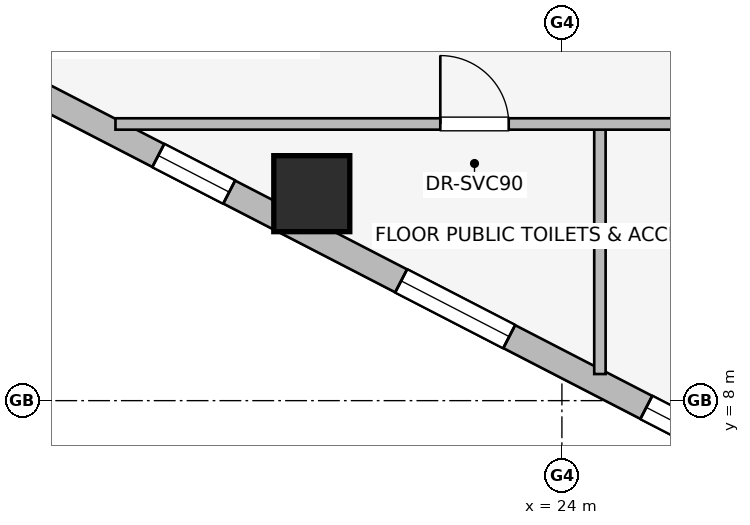
"""IFC4 building model, lengths in metres.
Left out: names, types, materials, properties, quantities, classifications, styles, units other than length and angle.
Written with IfcOpenShell. Run it as: python <this file> out.ifc"""

import sys

from ifc_helpers import new_model, si_unit, direction, frame, frame_2d, origin, origin_2d, place, context, subcontext, project, spatial, rectangle, extrude, element, fill, save


model = new_model("IFC4")
c1 = context("Model", 3, precision=1e-05, world=origin(), true_north=direction((0.0, 1.0)))
c2 = subcontext(c1, "Body", "Model", "MODEL_VIEW")
j1 = project(units=[si_unit("LENGTHUNIT", "METRE"), si_unit("PLANEANGLEUNIT", "RADIAN")], contexts=[c1])
p1 = place(None, origin())
s1 = spatial("IfcSite", under=j1, at=p1, CompositionType="ELEMENT")
p2 = place(p1, origin())
s2 = spatial("IfcBuilding", under=s1, at=p2, CompositionType="ELEMENT")
p3 = place(p2, frame((0.0, 0.0, 153.3)))
s3 = spatial("IfcBuildingStorey", under=s2, at=p3, CompositionType="ELEMENT", Elevation=153.3)
p4 = place(p3, frame((20.709, 10.723, 0.0), z_axis=(0.0, 0.0, 1.0), x_axis=(1.0, 0.0, 0.0)))
e1 = element("IfcColumn", 1, at=p4, inside=s3, PredefinedType="COLUMN", context=c2, shape_type="SweptSolid", body=[
    extrude(rectangle(XDim=1.0, YDim=1.0, at=origin_2d()), origin(), (0.0, 0.0, 1.0), 3.45),
])
p5 = place(p3, frame((17.243, 11.95, 0.0), z_axis=(0.0, 0.0, 1.0), x_axis=(-0.790621329885, 0.612305408053, 0.0)))
e2 = element("IfcWall", 2, at=p5, inside=s3, PredefinedType="STANDARD", context=c2, shape_type="SweptSolid", body=[
    extrude(rectangle(XDim=1.676, YDim=0.33, at=frame_2d((0.838, 0.0))), origin(), (0.0, 0.0, 1.0), 3.19),
])
p6 = place(p3, frame((33.769, 3.442, 0.0), z_axis=(0.0, 0.0, 1.0), x_axis=(-0.888613612362, 0.458656568606, 0.0)))
e3 = element("IfcWall", 3, at=p6, inside=s3, PredefinedType="STANDARD", context=c2, shape_type="SweptSolid", body=[
    extrude(rectangle(XDim=18.681, YDim=0.34, at=frame_2d((9.34, 0.0))), origin(), (0.0, 0.0, 1.0), 3.19),
])
p7 = place(p6, frame((1.75, 0.0, 0.75)))
e4 = element("IfcOpeningElement", 4, at=p7, cuts=e3, PredefinedType="OPENING", context=c2, shape_type="SweptSolid", body=[
    extrude(rectangle(XDim=1.05, YDim=1.4, at=frame_2d((0.525, 0.7))), frame((0.0, 0.18, 0.0), z_axis=(0.0, -1.0, 0.0), x_axis=(1.0, 0.0, 0.0)), (0.0, 0.0, 1.0), 0.36),
])
p8 = place(p6, frame((4.765, 0.0, 0.75)))
e5 = element("IfcOpeningElement", 5, at=p8, cuts=e3, PredefinedType="OPENING", context=c2, shape_type="SweptSolid", body=[
    extrude(rectangle(XDim=2.1, YDim=1.5, at=frame_2d((1.05, 0.75))), frame((0.0, 0.18, 0.0), z_axis=(0.0, -1.0, 0.0), x_axis=(1.0, 0.0, 0.0)), (0.0, 0.0, 1.0), 0.36),
])
p9 = place(p6, frame((7.644, 0.0, 0.75)))
e6 = element("IfcOpeningElement", 6, at=p9, cuts=e3, PredefinedType="OPENING", context=c2, shape_type="SweptSolid", body=[
    extrude(rectangle(XDim=2.1, YDim=1.5, at=frame_2d((1.05, 0.75))), frame((0.0, 0.18, 0.0), z_axis=(0.0, -1.0, 0.0), x_axis=(1.0, 0.0, 0.0)), (0.0, 0.0, 1.0), 0.36),
])
p10 = place(p6, frame((11.774, 0.0, 0.75)))
e7 = element("IfcOpeningElement", 7, at=p10, cuts=e3, PredefinedType="OPENING", context=c2, shape_type="SweptSolid", body=[
    extrude(rectangle(XDim=1.6, YDim=1.55, at=frame_2d((0.8, 0.775))), frame((0.0, 0.18, 0.0), z_axis=(0.0, -1.0, 0.0), x_axis=(1.0, 0.0, 0.0)), (0.0, 0.0, 1.0), 0.36),
])
p11 = place(p6, frame((15.92, 0.0, 0.75)))
e8 = element("IfcOpeningElement", 8, at=p11, cuts=e3, PredefinedType="OPENING", context=c2, shape_type="SweptSolid", body=[
    extrude(rectangle(XDim=1.05, YDim=1.4, at=frame_2d((0.525, 0.7))), frame((0.0, 0.18, 0.0), z_axis=(0.0, -1.0, 0.0), x_axis=(1.0, 0.0, 0.0)), (0.0, 0.0, 1.0), 0.36),
])
p12 = place(p3, frame((24.5, 8.35, 0.0), z_axis=(0.0, 0.0, 1.0), x_axis=(0.0, 1.0, 0.0)))
e9 = element("IfcWall", 9, at=p12, inside=s3, PredefinedType="PARTITIONING", context=c2, shape_type="SweptSolid", body=[
    extrude(rectangle(XDim=3.29, YDim=0.15, at=frame_2d((1.645, 0.0))), origin(), (0.0, 0.0, 1.0), 3.19),
])
p13 = place(p3, frame((18.126, 11.64, 0.0), z_axis=(0.0, 0.0, 1.0), x_axis=(1.0, 0.0, 0.0)))
e10 = element("IfcWall", 10, at=p13, inside=s3, PredefinedType="PARTITIONING", context=c2, shape_type="SweptSolid", body=[
    extrude(rectangle(XDim=14.724, YDim=0.15, at=frame_2d((7.362, 0.0))), origin(), (0.0, 0.0, 1.0), 3.19),
])
p14 = place(p13, frame((4.274, 0.0, 0.0)))
e11 = element("IfcOpeningElement", 11, at=p14, cuts=e10, PredefinedType="OPENING", context=c2, shape_type="SweptSolid", body=[
    extrude(rectangle(XDim=0.9, YDim=2.0, at=frame_2d((0.45, 1.0))), frame((0.0, 0.085, 0.0), z_axis=(0.0, -1.0, 0.0), x_axis=(1.0, 0.0, 0.0)), (0.0, 0.0, 1.0), 0.17),
])
p15 = place(p13, frame((7.724, 0.0, 0.0)))
e12 = element("IfcOpeningElement", 12, at=p15, cuts=e10, PredefinedType="OPENING", context=c2, shape_type="SweptSolid", body=[
    extrude(rectangle(XDim=0.9, YDim=2.0, at=frame_2d((0.45, 1.0))), frame((0.0, 0.085, 0.0), z_axis=(0.0, -1.0, 0.0), x_axis=(1.0, 0.0, 0.0)), (0.0, 0.0, 1.0), 0.17),
])
p16 = place(p9, origin())
e13 = element("IfcWindow", 13, at=p16, inside=s3, PartitioningType="SINGLE_PANEL", PredefinedType="WINDOW", context=c2, shape_type="SweptSolid", body=[
    extrude(rectangle(XDim=2.1, YDim=1.5, at=frame_2d((1.05, 0.75))), frame((0.0, 0.03, 0.0), z_axis=(0.0, -1.0, 0.0), x_axis=(1.0, 0.0, 0.0)), (0.0, 0.0, 1.0), 0.06),
])
fill(e6, e13)
p17 = place(p10, origin())
e14 = element("IfcWindow", 14, at=p17, inside=s3, PartitioningType="SINGLE_PANEL", PredefinedType="WINDOW", context=c2, shape_type="SweptSolid", body=[
    extrude(rectangle(XDim=1.6, YDim=1.55, at=frame_2d((0.8, 0.775))), frame((0.0, 0.03, 0.0), z_axis=(0.0, -1.0, 0.0), x_axis=(1.0, 0.0, 0.0)), (0.0, 0.0, 1.0), 0.06),
])
fill(e7, e14)
p18 = place(p11, origin())
e15 = element("IfcWindow", 15, at=p18, inside=s3, PartitioningType="SINGLE_PANEL", PredefinedType="WINDOW", context=c2, shape_type="SweptSolid", body=[
    extrude(rectangle(XDim=1.05, YDim=1.4, at=frame_2d((0.525, 0.7))), frame((0.0, 0.03, 0.0), z_axis=(0.0, -1.0, 0.0), x_axis=(1.0, 0.0, 0.0)), (0.0, 0.0, 1.0), 0.06),
])
fill(e8, e15)
p19 = place(p14, origin())
e16 = element("IfcDoor", 16, at=p19, inside=s3, OperationType="SINGLE_SWING_LEFT", PredefinedType="DOOR", context=c2, shape_type="SweptSolid", body=[
    extrude(rectangle(XDim=0.9, YDim=2.0, at=frame_2d((0.45, 1.0))), frame((0.0, 0.025, 0.0), z_axis=(0.0, -1.0, 0.0), x_axis=(1.0, 0.0, 0.0)), (0.0, 0.0, 1.0), 0.05),
])
fill(e11, e16)
save(model, sys.argv[1])
